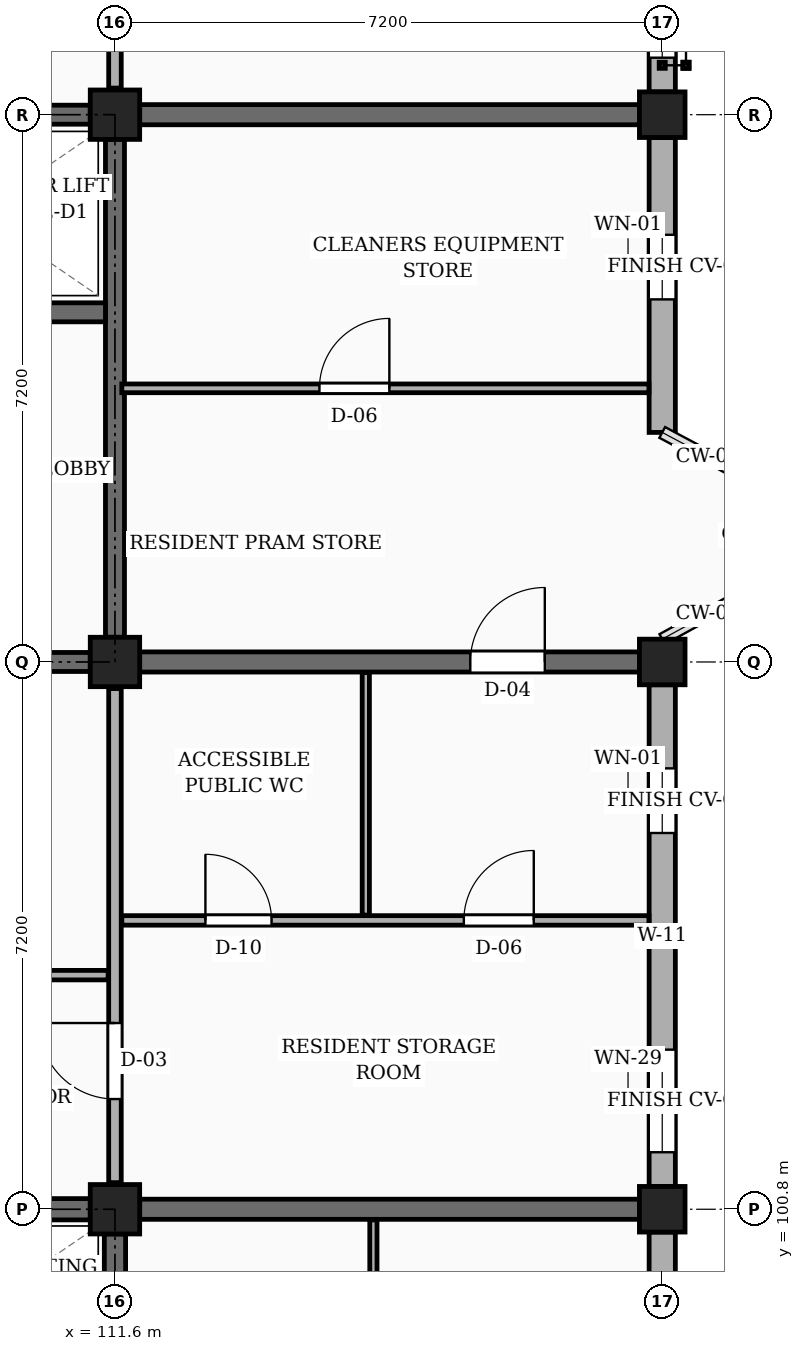
"""IFC4 building model, lengths in metres.
Left out: names, types, materials, properties, quantities, classifications, styles, units other than length and angle.
Written with IfcOpenShell. Run it as: python <this file> out.ifc"""

import sys

from ifc_helpers import new_model, si_unit, direction, frame, frame_2d, origin, origin_2d, place, context, subcontext, project, spatial, rectangle, extrude, element, fill, save


model = new_model("IFC4")
c1 = context("Model", 3, precision=1e-05, world=origin(), true_north=direction((0.0, 1.0)))
c2 = subcontext(c1, "Body", "Model", "MODEL_VIEW")
j1 = project(units=[si_unit("LENGTHUNIT", "METRE"), si_unit("PLANEANGLEUNIT", "RADIAN")], contexts=[c1])
p1 = place(None, origin())
s1 = spatial("IfcSite", under=j1, at=p1, CompositionType="ELEMENT")
p2 = place(p1, origin())
s2 = spatial("IfcBuilding", under=s1, at=p2, CompositionType="ELEMENT")
p3 = place(p2, frame((0.0, 0.0, 7.65)))
s3 = spatial("IfcBuildingStorey", under=s2, at=p3, CompositionType="ELEMENT", Elevation=7.65)
for number, where, z_axis, x_axis in (
    (1, (111.6, 100.8, 0.0), (0.0, 0.0, 1.0), (1.0, 0.0, 0.0)),
    (2, (111.6, 108.0, 0.0), (0.0, 0.0, 1.0), (1.0, 0.0, 0.0)),
    (3, (111.6, 115.2, 0.0), (0.0, 0.0, 1.0), (1.0, 0.0, 0.0)),
):
    element("IfcColumn", number, at=place(p3, frame(where, z_axis=z_axis, x_axis=x_axis)), inside=s3, PredefinedType="COLUMN", context=c2, shape_type="SweptSolid", body=[
        extrude(rectangle(XDim=0.65, YDim=0.65, at=origin_2d()), origin(), (0.0, 0.0, 1.0), 3.15),
    ])
for number, where, z_axis, x_axis in (
    (4, (118.8, 100.8, 0.0), (0.0, 0.0, 1.0), (1.0, 0.0, 0.0)),
    (5, (118.8, 108.0, 0.0), (0.0, 0.0, 1.0), (1.0, 0.0, 0.0)),
    (6, (118.8, 115.2, 0.0), (0.0, 0.0, 1.0), (1.0, 0.0, 0.0)),
):
    element("IfcColumn", number, at=place(p3, frame(where, z_axis=z_axis, x_axis=x_axis)), inside=s3, PredefinedType="COLUMN", context=c2, shape_type="SweptSolid", body=[
        extrude(rectangle(XDim=0.6, YDim=0.6, at=origin_2d()), origin(), (0.0, 0.0, 1.0), 3.15),
    ])
p4 = place(p3, frame((111.925, 100.8, 0.0), z_axis=(0.0, 0.0, 1.0), x_axis=(1.0, 0.0, 0.0)))
e7 = element("IfcWall", 7, at=p4, inside=s3, PredefinedType="SOLIDWALL", context=c2, shape_type="SweptSolid", body=[
    extrude(rectangle(XDim=6.575, YDim=0.265, at=frame_2d((3.288, 0.0))), origin(), (0.0, 0.0, 1.0), 2.19),
])
p5 = place(p3, frame((111.925, 108.0, 0.0), z_axis=(0.0, 0.0, 1.0), x_axis=(1.0, 0.0, 0.0)))
e8 = element("IfcWall", 8, at=p5, inside=s3, PredefinedType="SOLIDWALL", context=c2, shape_type="SweptSolid", body=[
    extrude(rectangle(XDim=6.575, YDim=0.265, at=frame_2d((3.288, 0.0))), origin(), (0.0, 0.0, 1.0), 2.19),
])
p6 = place(p5, frame((4.35, 0.0, 0.0)))
e9 = element("IfcOpeningElement", 9, at=p6, cuts=e8, PredefinedType="OPENING", context=c2, shape_type="SweptSolid", body=[
    extrude(rectangle(XDim=0.98, YDim=2.12, at=frame_2d((0.49, 1.06))), frame((0.0, 0.143, 0.0), z_axis=(0.0, -1.0, 0.0), x_axis=(1.0, 0.0, 0.0)), (0.0, 0.0, 1.0), 0.285),
])
p7 = place(p3, frame((111.925, 115.2, 0.0), z_axis=(0.0, 0.0, 1.0), x_axis=(1.0, 0.0, 0.0)))
e10 = element("IfcWall", 10, at=p7, inside=s3, PredefinedType="SOLIDWALL", context=c2, shape_type="SweptSolid", body=[
    extrude(rectangle(XDim=6.575, YDim=0.265, at=frame_2d((3.288, 0.0))), origin(), (0.0, 0.0, 1.0), 2.19),
])
p8 = place(p3, frame((118.8, 93.9, 0.0), z_axis=(0.0, 0.0, 1.0), x_axis=(0.0, 1.0, 0.0)))
e11 = element("IfcWall", 11, at=p8, inside=s3, PredefinedType="SOLIDWALL", context=c2, shape_type="SweptSolid", body=[
    extrude(rectangle(XDim=6.6, YDim=0.345, at=frame_2d((3.3, 0.0))), origin(), (0.0, 0.0, 1.0), 2.46),
])
p9 = place(p8, frame((0.45, 0.0, 0.78)))
e12 = element("IfcOpeningElement", 12, at=p9, cuts=e11, PredefinedType="OPENING", context=c2, shape_type="SweptSolid", body=[
    extrude(rectangle(XDim=1.15, YDim=1.44, at=frame_2d((0.575, 0.72))), frame((0.0, 0.183, 0.0), z_axis=(0.0, -1.0, 0.0), x_axis=(1.0, 0.0, 0.0)), (0.0, 0.0, 1.0), 0.365),
])
p10 = place(p8, frame((4.65, 0.0, 0.78)))
e13 = element("IfcOpeningElement", 13, at=p10, cuts=e11, PredefinedType="OPENING", context=c2, shape_type="SweptSolid", body=[
    extrude(rectangle(XDim=1.35, YDim=1.44, at=frame_2d((0.675, 0.72))), frame((0.0, 0.183, 0.0), z_axis=(0.0, -1.0, 0.0), x_axis=(1.0, 0.0, 0.0)), (0.0, 0.0, 1.0), 0.365),
])
p11 = place(p3, frame((118.8, 101.1, 0.0), z_axis=(0.0, 0.0, 1.0), x_axis=(0.0, 1.0, 0.0)))
e14 = element("IfcWall", 14, at=p11, inside=s3, PredefinedType="SOLIDWALL", context=c2, shape_type="SweptSolid", body=[
    extrude(rectangle(XDim=6.6, YDim=0.345, at=frame_2d((3.3, 0.0))), origin(), (0.0, 0.0, 1.0), 2.46),
])
p12 = place(p11, frame((0.45, 0.0, 0.78)))
e15 = element("IfcOpeningElement", 15, at=p12, cuts=e14, PredefinedType="OPENING", context=c2, shape_type="SweptSolid", body=[
    extrude(rectangle(XDim=1.35, YDim=1.44, at=frame_2d((0.675, 0.72))), frame((0.0, 0.183, 0.0), z_axis=(0.0, -1.0, 0.0), x_axis=(1.0, 0.0, 0.0)), (0.0, 0.0, 1.0), 0.365),
])
p13 = place(p11, frame((4.65, 0.0, 0.78)))
e16 = element("IfcOpeningElement", 16, at=p13, cuts=e14, PredefinedType="OPENING", context=c2, shape_type="SweptSolid", body=[
    extrude(rectangle(XDim=0.85, YDim=1.15, at=frame_2d((0.425, 0.575))), frame((0.0, 0.183, 0.0), z_axis=(0.0, -1.0, 0.0), x_axis=(1.0, 0.0, 0.0)), (0.0, 0.0, 1.0), 0.365),
])
p14 = place(p3, frame((118.8, 111.02, 0.0), z_axis=(0.0, 0.0, 1.0), x_axis=(0.0, 1.0, 0.0)))
e17 = element("IfcWall", 17, at=p14, inside=s3, PredefinedType="SOLIDWALL", context=c2, shape_type="SweptSolid", body=[
    extrude(rectangle(XDim=3.88, YDim=0.345, at=frame_2d((1.94, 0.0))), origin(), (0.0, 0.0, 1.0), 2.46),
])
p15 = place(p14, frame((1.75, 0.0, 0.78)))
e18 = element("IfcOpeningElement", 18, at=p15, cuts=e17, PredefinedType="OPENING", context=c2, shape_type="SweptSolid", body=[
    extrude(rectangle(XDim=0.85, YDim=1.15, at=frame_2d((0.425, 0.575))), frame((0.0, 0.183, 0.0), z_axis=(0.0, -1.0, 0.0), x_axis=(1.0, 0.0, 0.0)), (0.0, 0.0, 1.0), 0.365),
])
p16 = place(p3, frame((118.8, 115.5, 0.0), z_axis=(0.0, 0.0, 1.0), x_axis=(0.0, 1.0, 0.0)))
e19 = element("IfcWall", 19, at=p16, inside=s3, PredefinedType="SOLIDWALL", context=c2, shape_type="SweptSolid", body=[
    extrude(rectangle(XDim=6.6, YDim=0.345, at=frame_2d((3.3, 0.0))), origin(), (0.0, 0.0, 1.0), 2.46),
])
p17 = place(p16, frame((0.45, 0.0, 0.78)))
e20 = element("IfcOpeningElement", 20, at=p17, cuts=e19, PredefinedType="OPENING", context=c2, shape_type="SweptSolid", body=[
    extrude(rectangle(XDim=0.92, YDim=1.15, at=frame_2d((0.46, 0.575))), frame((0.0, 0.183, 0.0), z_axis=(0.0, -1.0, 0.0), x_axis=(1.0, 0.0, 0.0)), (0.0, 0.0, 1.0), 0.365),
])
p18 = place(p16, frame((4.65, 0.0, 0.78)))
e21 = element("IfcOpeningElement", 21, at=p18, cuts=e19, PredefinedType="OPENING", context=c2, shape_type="SweptSolid", body=[
    extrude(rectangle(XDim=1.08, YDim=1.15, at=frame_2d((0.54, 0.575))), frame((0.0, 0.183, 0.0), z_axis=(0.0, -1.0, 0.0), x_axis=(1.0, 0.0, 0.0)), (0.0, 0.0, 1.0), 0.365),
])
p19 = place(p3, frame((104.725, 100.8, 0.0), z_axis=(0.0, 0.0, 1.0), x_axis=(1.0, 0.0, 0.0)))
e22 = element("IfcWall", 22, at=p19, inside=s3, PredefinedType="SHEAR", context=c2, shape_type="SweptSolid", body=[
    extrude(rectangle(XDim=6.55, YDim=0.28, at=frame_2d((3.275, 0.0))), origin(), (0.0, 0.0, 1.0), 2.89),
])
p20 = place(p3, frame((111.6, 93.925, 0.0), z_axis=(0.0, 0.0, 1.0), x_axis=(0.0, 1.0, 0.0)))
e23 = element("IfcWall", 23, at=p20, inside=s3, PredefinedType="SHEAR", context=c2, shape_type="SweptSolid", body=[
    extrude(rectangle(XDim=6.55, YDim=0.28, at=frame_2d((3.275, 0.0))), origin(), (0.0, 0.0, 1.0), 2.89),
])
p21 = place(p3, frame((104.725, 115.2, 0.0), z_axis=(0.0, 0.0, 1.0), x_axis=(1.0, 0.0, 0.0)))
e24 = element("IfcWall", 24, at=p21, inside=s3, PredefinedType="SHEAR", context=c2, shape_type="SweptSolid", body=[
    extrude(rectangle(XDim=6.55, YDim=0.25, at=frame_2d((3.275, 0.0))), origin(), (0.0, 0.0, 1.0), 2.89),
])
p22 = place(p3, frame((111.6, 108.325, 0.0), z_axis=(0.0, 0.0, 1.0), x_axis=(0.0, 1.0, 0.0)))
e25 = element("IfcWall", 25, at=p22, inside=s3, PredefinedType="SHEAR", context=c2, shape_type="SweptSolid", body=[
    extrude(rectangle(XDim=6.55, YDim=0.25, at=frame_2d((3.275, 0.0))), origin(), (0.0, 0.0, 1.0), 2.89),
])
p23 = place(p3, frame((104.725, 108.0, 0.0), z_axis=(0.0, 0.0, 1.0), x_axis=(1.0, 0.0, 0.0)))
e26 = element("IfcWall", 26, at=p23, inside=s3, PredefinedType="SHEAR", context=c2, shape_type="SweptSolid", body=[
    extrude(rectangle(XDim=6.55, YDim=0.25, at=frame_2d((3.275, 0.0))), origin(), (0.0, 0.0, 1.0), 2.89),
])
p24 = place(p23, frame((4.425, 0.0, 0.0)))
e27 = element("IfcOpeningElement", 27, at=p24, cuts=e26, PredefinedType="OPENING", context=c2, shape_type="SweptSolid", body=[
    extrude(rectangle(XDim=1.1, YDim=2.15, at=frame_2d((0.55, 1.075))), frame((0.0, 0.135, 0.0), z_axis=(0.0, -1.0, 0.0), x_axis=(1.0, 0.0, 0.0)), (0.0, 0.0, 1.0), 0.27),
])
p25 = place(p3, frame((108.125, 112.6, 0.0), z_axis=(0.0, 0.0, 1.0), x_axis=(1.0, 0.0, 0.0)))
e28 = element("IfcWall", 28, at=p25, inside=s3, PredefinedType="SHEAR", context=c2, shape_type="SweptSolid", body=[
    extrude(rectangle(XDim=3.35, YDim=0.25, at=frame_2d((1.675, 0.0))), origin(), (0.0, 0.0, 1.0), 2.89),
])
p26 = place(p25, frame((1.1, 0.0, 0.0)))
e29 = element("IfcOpeningElement", 29, at=p26, cuts=e28, PredefinedType="OPENING", context=c2, shape_type="SweptSolid", body=[
    extrude(rectangle(XDim=1.0, YDim=2.2, at=frame_2d((0.5, 1.1))), frame((0.0, 0.135, 0.0), z_axis=(0.0, -1.0, 0.0), x_axis=(1.0, 0.0, 0.0)), (0.0, 0.0, 1.0), 0.27),
])
p27 = place(p3, frame((111.6, 101.15, 0.0), z_axis=(0.0, 0.0, 1.0), x_axis=(0.0, 1.0, 0.0)))
e30 = element("IfcWall", 30, at=p27, inside=s3, PredefinedType="PARTITIONING", context=c2, shape_type="SweptSolid", body=[
    extrude(rectangle(XDim=6.5, YDim=0.165, at=frame_2d((3.25, 0.0))), origin(), (0.0, 0.0, 1.0), 2.24),
])
p28 = place(p27, frame((1.1, 0.0, 0.0)))
e31 = element("IfcOpeningElement", 31, at=p28, cuts=e30, PredefinedType="OPENING", context=c2, shape_type="SweptSolid", body=[
    extrude(rectangle(XDim=1.0, YDim=2.15, at=frame_2d((0.5, 1.075))), frame((0.0, 0.093, 0.0), z_axis=(0.0, -1.0, 0.0), x_axis=(1.0, 0.0, 0.0)), (0.0, 0.0, 1.0), 0.185),
])
p29 = place(p3, frame((111.6, 115.55, 0.0), z_axis=(0.0, 0.0, 1.0), x_axis=(0.0, 1.0, 0.0)))
e32 = element("IfcWall", 32, at=p29, inside=s3, PredefinedType="PARTITIONING", context=c2, shape_type="SweptSolid", body=[
    extrude(rectangle(XDim=6.5, YDim=0.165, at=frame_2d((3.25, 0.0))), origin(), (0.0, 0.0, 1.0), 2.24),
])
p30 = place(p29, frame((1.1, 0.0, 0.0)))
e33 = element("IfcOpeningElement", 33, at=p30, cuts=e32, PredefinedType="OPENING", context=c2, shape_type="SweptSolid", body=[
    extrude(rectangle(XDim=0.94, YDim=2.12, at=frame_2d((0.47, 1.06))), frame((0.0, 0.093, 0.0), z_axis=(0.0, -1.0, 0.0), x_axis=(1.0, 0.0, 0.0)), (0.0, 0.0, 1.0), 0.185),
])
p31 = place(p3, frame((115.0, 96.97, 0.0), z_axis=(0.0, 0.0, 1.0), x_axis=(0.0, 1.0, 0.0)))
e34 = element("IfcWall", 34, at=p31, inside=s3, PredefinedType="PARTITIONING", context=c2, shape_type="SweptSolid", body=[
    extrude(rectangle(XDim=3.69, YDim=0.095, at=frame_2d((1.845, 0.0))), origin(), (0.0, 0.0, 1.0), 2.325),
])
p32 = place(p3, frame((104.49, 103.88, 0.0), z_axis=(0.0, 0.0, 1.0), x_axis=(1.0, 0.0, 0.0)))
e35 = element("IfcWall", 35, at=p32, inside=s3, PredefinedType="PARTITIONING", context=c2, shape_type="SweptSolid", body=[
    extrude(rectangle(XDim=7.02, YDim=0.125, at=frame_2d((3.51, 0.0))), origin(), (0.0, 0.0, 1.0), 2.325),
])
p33 = place(p32, frame((2.85, 0.0, 0.0)))
e36 = element("IfcOpeningElement", 36, at=p33, cuts=e35, PredefinedType="OPENING", context=c2, shape_type="SweptSolid", body=[
    extrude(rectangle(XDim=1.02, YDim=2.15, at=frame_2d((0.51, 1.075))), frame((0.0, 0.073, 0.0), z_axis=(0.0, -1.0, 0.0), x_axis=(1.0, 0.0, 0.0)), (0.0, 0.0, 1.0), 0.145),
])
p34 = place(p3, frame((111.69, 104.6, 0.0), z_axis=(0.0, 0.0, 1.0), x_axis=(1.0, 0.0, 0.0)))
e37 = element("IfcWall", 37, at=p34, inside=s3, PredefinedType="PARTITIONING", context=c2, shape_type="SweptSolid", body=[
    extrude(rectangle(XDim=6.935, YDim=0.125, at=frame_2d((3.468, 0.0))), origin(), (0.0, 0.0, 1.0), 2.325),
])
p35 = place(p34, frame((1.1, 0.0, 0.0)))
e38 = element("IfcOpeningElement", 38, at=p35, cuts=e37, PredefinedType="OPENING", context=c2, shape_type="SweptSolid", body=[
    extrude(rectangle(XDim=0.87, YDim=2.05, at=frame_2d((0.435, 1.025))), frame((0.0, 0.073, 0.0), z_axis=(0.0, -1.0, 0.0), x_axis=(1.0, 0.0, 0.0)), (0.0, 0.0, 1.0), 0.145),
])
p36 = place(p34, frame((4.5, 0.0, 0.0)))
e39 = element("IfcOpeningElement", 39, at=p36, cuts=e37, PredefinedType="OPENING", context=c2, shape_type="SweptSolid", body=[
    extrude(rectangle(XDim=0.92, YDim=2.1, at=frame_2d((0.46, 1.05))), frame((0.0, 0.073, 0.0), z_axis=(0.0, -1.0, 0.0), x_axis=(1.0, 0.0, 0.0)), (0.0, 0.0, 1.0), 0.145),
])
p37 = place(p3, frame((114.9, 104.67, 0.0), z_axis=(0.0, 0.0, 1.0), x_axis=(0.0, 1.0, 0.0)))
e40 = element("IfcWall", 40, at=p37, inside=s3, PredefinedType="PARTITIONING", context=c2, shape_type="SweptSolid", body=[
    extrude(rectangle(XDim=3.19, YDim=0.095, at=frame_2d((1.595, 0.0))), origin(), (0.0, 0.0, 1.0), 2.325),
])
p38 = place(p3, frame((111.69, 111.6, 0.0), z_axis=(0.0, 0.0, 1.0), x_axis=(1.0, 0.0, 0.0)))
e41 = element("IfcWall", 41, at=p38, inside=s3, PredefinedType="PARTITIONING", context=c2, shape_type="SweptSolid", body=[
    extrude(rectangle(XDim=6.935, YDim=0.115, at=frame_2d((3.468, 0.0))), origin(), (0.0, 0.0, 1.0), 2.325),
])
p39 = place(p38, frame((2.6, 0.0, 0.0)))
e42 = element("IfcOpeningElement", 42, at=p39, cuts=e41, PredefinedType="OPENING", context=c2, shape_type="SweptSolid", body=[
    extrude(rectangle(XDim=0.92, YDim=2.1, at=frame_2d((0.46, 1.05))), frame((0.0, 0.067, 0.0), z_axis=(0.0, -1.0, 0.0), x_axis=(1.0, 0.0, 0.0)), (0.0, 0.0, 1.0), 0.135),
])
p40 = place(p12, origin())
e43 = element("IfcWindow", 43, at=p40, inside=s3, PartitioningType="SINGLE_PANEL", PredefinedType="WINDOW", context=c2, shape_type="SweptSolid", body=[
    extrude(rectangle(XDim=1.35, YDim=1.44, at=frame_2d((0.675, 0.72))), frame((0.0, 0.03, 0.0), z_axis=(0.0, -1.0, 0.0), x_axis=(1.0, 0.0, 0.0)), (0.0, 0.0, 1.0), 0.06),
])
fill(e15, e43)
p41 = place(p13, origin())
e44 = element("IfcWindow", 44, at=p41, inside=s3, PartitioningType="SINGLE_PANEL", PredefinedType="WINDOW", context=c2, shape_type="SweptSolid", body=[
    extrude(rectangle(XDim=0.85, YDim=1.15, at=frame_2d((0.425, 0.575))), frame((0.0, 0.03, 0.0), z_axis=(0.0, -1.0, 0.0), x_axis=(1.0, 0.0, 0.0)), (0.0, 0.0, 1.0), 0.06),
])
fill(e16, e44)
p42 = place(p15, origin())
e45 = element("IfcWindow", 45, at=p42, inside=s3, PartitioningType="SINGLE_PANEL", PredefinedType="WINDOW", context=c2, shape_type="SweptSolid", body=[
    extrude(rectangle(XDim=0.85, YDim=1.15, at=frame_2d((0.425, 0.575))), frame((0.0, 0.03, 0.0), z_axis=(0.0, -1.0, 0.0), x_axis=(1.0, 0.0, 0.0)), (0.0, 0.0, 1.0), 0.06),
])
fill(e18, e45)
p43 = place(p17, origin())
e46 = element("IfcWindow", 46, at=p43, inside=s3, PartitioningType="SINGLE_PANEL", PredefinedType="WINDOW", context=c2, shape_type="SweptSolid", body=[
    extrude(rectangle(XDim=0.92, YDim=1.15, at=frame_2d((0.46, 0.575))), frame((0.0, 0.03, 0.0), z_axis=(0.0, -1.0, 0.0), x_axis=(1.0, 0.0, 0.0)), (0.0, 0.0, 1.0), 0.06),
])
fill(e20, e46)
p44 = place(p28, origin())
e47 = element("IfcDoor", 47, at=p44, inside=s3, OperationType="SINGLE_SWING_RIGHT", PredefinedType="DOOR", context=c2, shape_type="SweptSolid", body=[
    extrude(rectangle(XDim=1.0, YDim=2.15, at=frame_2d((0.5, 1.075))), frame((0.0, 0.025, 0.0), z_axis=(0.0, -1.0, 0.0), x_axis=(1.0, 0.0, 0.0)), (0.0, 0.0, 1.0), 0.05),
])
fill(e31, e47)
p45 = place(p35, origin())
e48 = element("IfcDoor", 48, at=p45, inside=s3, OperationType="SINGLE_SWING_LEFT", PredefinedType="DOOR", context=c2, shape_type="SweptSolid", body=[
    extrude(rectangle(XDim=0.87, YDim=2.05, at=frame_2d((0.435, 1.025))), frame((0.0, 0.025, 0.0), z_axis=(0.0, -1.0, 0.0), x_axis=(1.0, 0.0, 0.0)), (0.0, 0.0, 1.0), 0.05),
])
fill(e38, e48)
p46 = place(p36, origin())
e49 = element("IfcDoor", 49, at=p46, inside=s3, OperationType="SINGLE_SWING_RIGHT", PredefinedType="DOOR", context=c2, shape_type="SweptSolid", body=[
    extrude(rectangle(XDim=0.92, YDim=2.1, at=frame_2d((0.46, 1.05))), frame((0.0, 0.025, 0.0), z_axis=(0.0, -1.0, 0.0), x_axis=(1.0, 0.0, 0.0)), (0.0, 0.0, 1.0), 0.05),
])
fill(e39, e49)
p47 = place(p39, origin())
e50 = element("IfcDoor", 50, at=p47, inside=s3, OperationType="SINGLE_SWING_RIGHT", PredefinedType="DOOR", context=c2, shape_type="SweptSolid", body=[
    extrude(rectangle(XDim=0.92, YDim=2.1, at=frame_2d((0.46, 1.05))), frame((0.0, 0.025, 0.0), z_axis=(0.0, -1.0, 0.0), x_axis=(1.0, 0.0, 0.0)), (0.0, 0.0, 1.0), 0.05),
])
fill(e42, e50)
p48 = place(p6, origin())
e51 = element("IfcDoor", 51, at=p48, inside=s3, OperationType="SINGLE_SWING_RIGHT", PredefinedType="DOOR", context=c2, shape_type="SweptSolid", body=[
    extrude(rectangle(XDim=0.98, YDim=2.12, at=frame_2d((0.49, 1.06))), frame((0.0, 0.025, 0.0), z_axis=(0.0, -1.0, 0.0), x_axis=(1.0, 0.0, 0.0)), (0.0, 0.0, 1.0), 0.05),
])
fill(e9, e51)
save(model, sys.argv[1])
